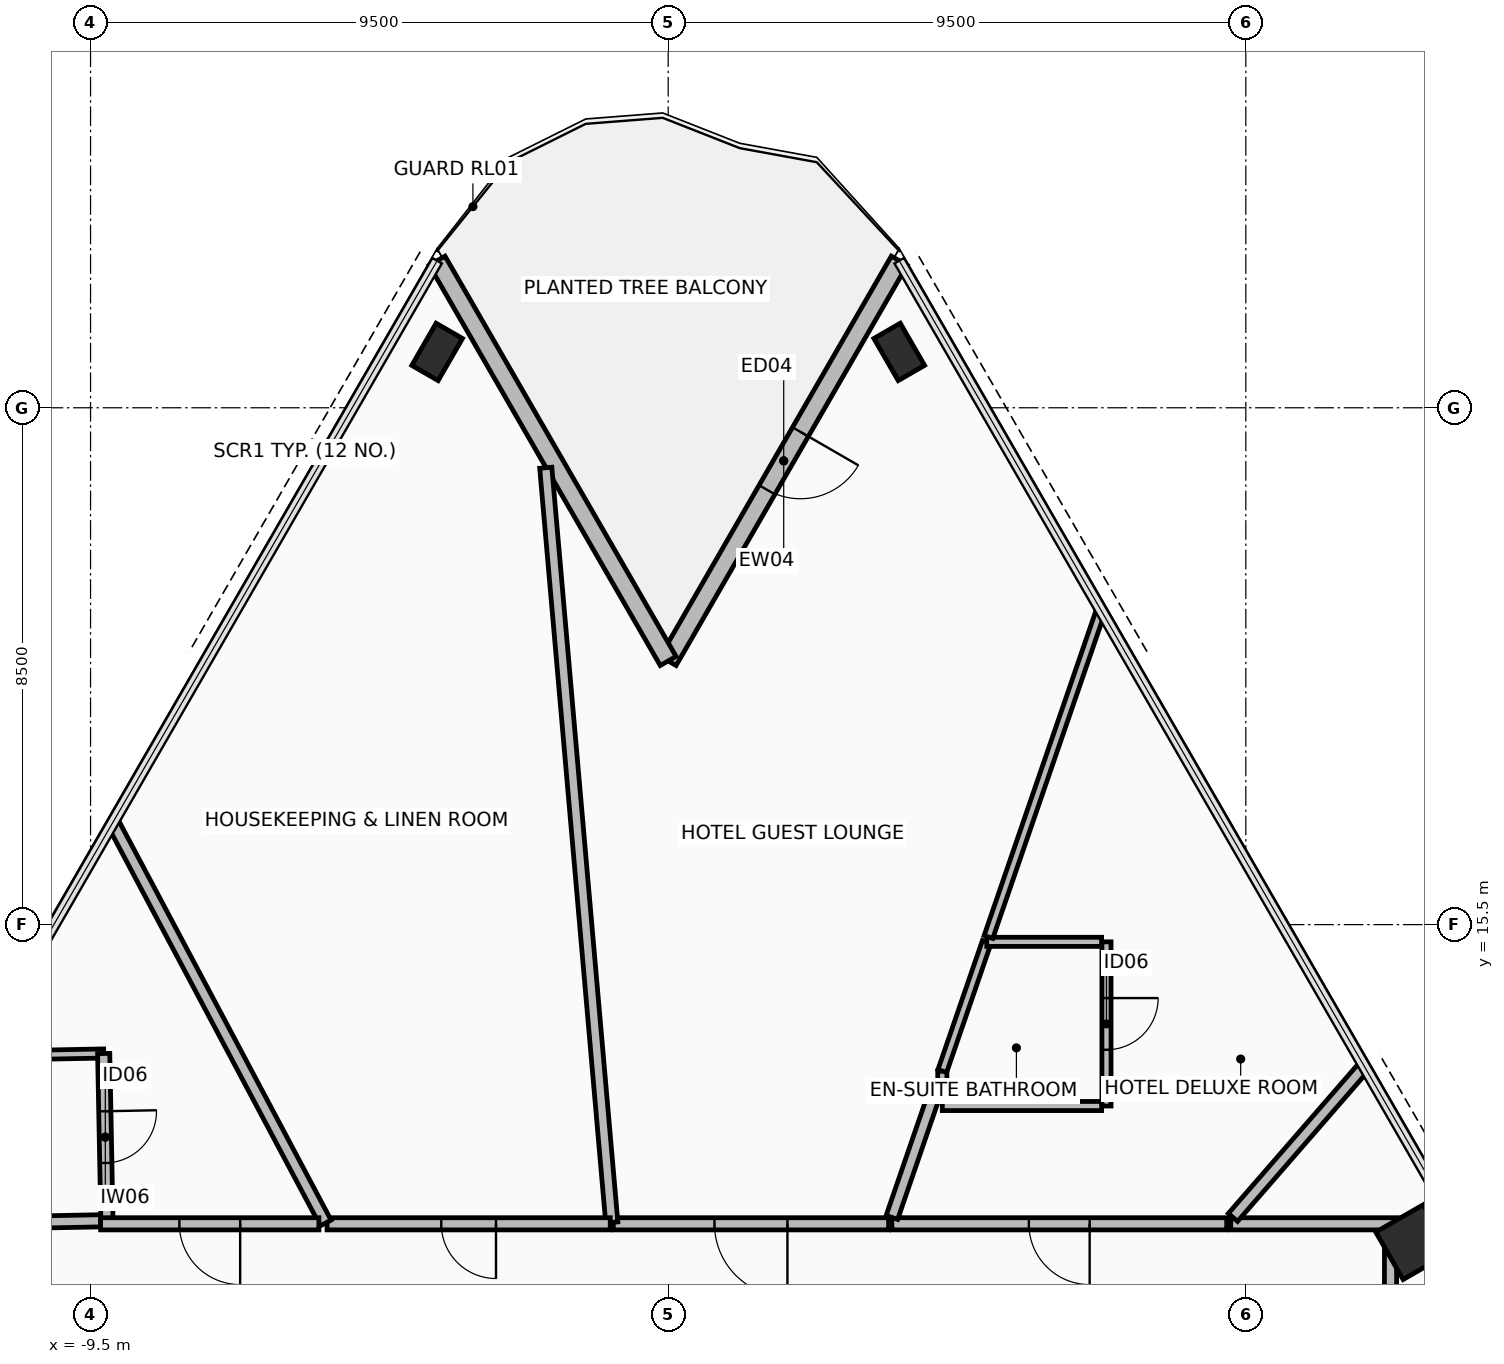
"""IFC4 building model, lengths in metres.
Left out: names, types, materials, properties, quantities, classifications, styles, units other than length and angle.
Written with IfcOpenShell. Run it as: python <this file> out.ifc"""

import sys

from ifc_helpers import new_model, si_unit, direction, frame, frame_2d, origin, origin_2d, place, context, subcontext, project, spatial, rectangle, hollow_rectangle, extrude, element, fill, save


model = new_model("IFC4")
c1 = context("Model", 3, precision=1e-05, world=origin(), true_north=direction((0.0, 1.0)))
c2 = subcontext(c1, "Body", "Model", "MODEL_VIEW")
j1 = project(units=[si_unit("LENGTHUNIT", "METRE"), si_unit("PLANEANGLEUNIT", "RADIAN")], contexts=[c1])
p1 = place(None, origin())
s1 = spatial("IfcSite", under=j1, at=p1, CompositionType="ELEMENT")
p2 = place(p1, origin())
s2 = spatial("IfcBuilding", under=s1, at=p2, CompositionType="ELEMENT")
p3 = place(p2, frame((0.0, 0.0, 38.65)))
s3 = spatial("IfcBuildingStorey", under=s2, at=p3, CompositionType="ELEMENT", Elevation=38.65)
p4 = place(p3, frame((-3.8, 24.918, 0.0), z_axis=(0.0, 0.0, 1.0), x_axis=(0.500001511499, 0.866024531118, 0.0)))
e1 = element("IfcColumn", 1, at=p4, inside=s3, PredefinedType="COLUMN", context=c2, shape_type="SweptSolid", body=[
    extrude(hollow_rectangle(XDim=0.5, YDim=0.8, WallThickness=0.04, at=origin_2d()), origin(), (0.0, 0.0, 1.0), 3.4),
])
p5 = place(p3, frame((12.252, 10.279, 0.0), z_axis=(0.0, 0.0, 1.0), x_axis=(-0.500001511499, 0.866024531118, 0.0)))
e2 = element("IfcColumn", 2, at=p5, inside=s3, PredefinedType="COLUMN", context=c2, shape_type="SweptSolid", body=[
    extrude(hollow_rectangle(XDim=0.9, YDim=0.9, WallThickness=0.05, at=origin_2d()), origin(), (0.0, 0.0, 1.0), 3.4),
])
p6 = place(p3, frame((3.8, 24.918, 0.0), z_axis=(0.0, 0.0, 1.0), x_axis=(-0.500001511499, 0.866024531118, 0.0)))
e3 = element("IfcColumn", 3, at=p6, inside=s3, PredefinedType="COLUMN", context=c2, shape_type="SweptSolid", body=[
    extrude(hollow_rectangle(XDim=0.5, YDim=0.8, WallThickness=0.04, at=origin_2d()), origin(), (0.0, 0.0, 1.0), 3.4),
])
p7 = place(p3, frame((3.8, 26.418, 0.0), z_axis=(0.0, 0.0, 1.0), x_axis=(-0.500005158081, -0.866022425744, 0.0)))
e4 = element("IfcWall", 4, at=p7, inside=s3, PredefinedType="STANDARD", context=c2, shape_type="SweptSolid", body=[
    extrude(rectangle(XDim=7.6, YDim=0.3, at=frame_2d((3.8, 0.0))), origin(), (0.0, 0.0, 1.0), 2.42),
])
p8 = place(p7, frame((3.25, 0.0, 0.0)))
e5 = element("IfcOpeningElement", 5, at=p8, cuts=e4, PredefinedType="OPENING", context=c2, shape_type="SweptSolid", body=[
    extrude(rectangle(XDim=1.1, YDim=2.2, at=frame_2d((0.55, 1.1))), frame((0.0, 0.16, 0.0), z_axis=(0.0, -1.0, 0.0), x_axis=(1.0, 0.0, 0.0)), (0.0, 0.0, 1.0), 0.32),
])
p9 = place(p3, frame((0.0, 19.836, 0.0), z_axis=(0.0, 0.0, 1.0), x_axis=(-0.500005158081, 0.866022425744, 0.0)))
e6 = element("IfcWall", 6, at=p9, inside=s3, PredefinedType="STANDARD", context=c2, shape_type="SweptSolid", body=[
    extrude(rectangle(XDim=7.6, YDim=0.3, at=frame_2d((3.8, 0.0))), origin(), (0.0, 0.0, 1.0), 2.42),
])
p10 = place(p3, frame((7.208, 15.217, 0.0), z_axis=(0.0, 0.0, 1.0), x_axis=(0.0, -1.0, 0.0)))
e7 = element("IfcWall", 7, at=p10, inside=s3, PredefinedType="PARTITIONING", context=c2, shape_type="SweptSolid", body=[
    extrude(rectangle(XDim=2.7, YDim=0.15, at=frame_2d((1.35, 0.0))), origin(), (0.0, 0.0, 1.0), 2.82),
])
p11 = place(p10, frame((0.925, 0.0, 0.0)))
e8 = element("IfcOpeningElement", 8, at=p11, cuts=e7, PredefinedType="OPENING", context=c2, shape_type="SweptSolid", body=[
    extrude(rectangle(XDim=0.85, YDim=2.1, at=frame_2d((0.425, 1.05))), frame((0.0, 0.085, 0.0), z_axis=(0.0, -1.0, 0.0), x_axis=(1.0, 0.0, 0.0)), (0.0, 0.0, 1.0), 0.17),
])
p12 = place(p3, frame((7.128, 12.517, 0.0), z_axis=(0.0, 0.0, 1.0), x_axis=(-1.0, 0.0, 0.0)))
e9 = element("IfcWall", 9, at=p12, inside=s3, PredefinedType="PARTITIONING", context=c2, shape_type="SweptSolid", body=[
    extrude(rectangle(XDim=2.62, YDim=0.15, at=frame_2d((1.31, 0.0))), origin(), (0.0, 0.0, 1.0), 2.82),
])
p13 = place(p3, frame((4.508, 12.597, 0.0), z_axis=(0.0, 0.0, 1.0), x_axis=(0.0, 1.0, 0.0)))
e10 = element("IfcWall", 10, at=p13, inside=s3, PredefinedType="PARTITIONING", context=c2, shape_type="SweptSolid", body=[
    extrude(rectangle(XDim=0.496, YDim=0.15, at=frame_2d((0.248, 0.0))), origin(), (0.0, 0.0, 1.0), 3.225),
])
p14 = place(p3, frame((4.508, 13.093, 0.0), z_axis=(0.0, 0.0, 1.0), x_axis=(0.325635598236, 0.945495350153, 0.0)))
e11 = element("IfcWall", 11, at=p14, inside=s3, PredefinedType="PARTITIONING", context=c2, shape_type="SweptSolid", body=[
    extrude(rectangle(XDim=2.246, YDim=0.15, at=frame_2d((1.123, 0.0))), origin(), (0.0, 0.0, 1.0), 2.82),
])
p15 = place(p3, frame((5.24, 15.217, 0.0), z_axis=(0.0, 0.0, 1.0), x_axis=(1.0, 0.0, 0.0)))
e12 = element("IfcWall", 12, at=p15, inside=s3, PredefinedType="PARTITIONING", context=c2, shape_type="SweptSolid", body=[
    extrude(rectangle(XDim=1.889, YDim=0.15, at=frame_2d((0.944, 0.0))), origin(), (0.0, 0.0, 1.0), 2.82),
])
p16 = place(p3, frame((-11.35, 13.341, 0.0), z_axis=(0.0, 0.0, 1.0), x_axis=(0.99981237896, 0.019370257549, 0.0)))
e13 = element("IfcWall", 13, at=p16, inside=s3, PredefinedType="PARTITIONING", context=c2, shape_type="SweptSolid", body=[
    extrude(rectangle(XDim=2.067, YDim=0.15, at=frame_2d((1.034, 0.0))), origin(), (0.0, 0.0, 1.0), 2.42),
])
p17 = place(p3, frame((-9.284, 13.381, 0.0), z_axis=(0.0, 0.0, 1.0), x_axis=(0.019353504647, -0.999812703389, 0.0)))
e14 = element("IfcWall", 14, at=p17, inside=s3, PredefinedType="PARTITIONING", context=c2, shape_type="SweptSolid", body=[
    extrude(rectangle(XDim=2.75, YDim=0.2, at=frame_2d((1.375, 0.0))), origin(), (0.0, 0.0, 1.0), 3.225),
])
p18 = place(p17, frame((0.95, 0.0, 0.0)))
e15 = element("IfcOpeningElement", 15, at=p18, cuts=e14, PredefinedType="OPENING", context=c2, shape_type="SweptSolid", body=[
    extrude(rectangle(XDim=0.85, YDim=2.1, at=frame_2d((0.425, 1.05))), frame((0.0, 0.11, 0.0), z_axis=(0.0, -1.0, 0.0), x_axis=(1.0, 0.0, 0.0)), (0.0, 0.0, 1.0), 0.22),
])
p19 = place(p3, frame((-9.335, 10.629, 0.0), z_axis=(0.0, 0.0, 1.0), x_axis=(-0.999811508702, -0.019415124705, 0.0)))
e16 = element("IfcWall", 16, at=p19, inside=s3, PredefinedType="PARTITIONING", context=c2, shape_type="SweptSolid", body=[
    extrude(rectangle(XDim=3.622, YDim=0.2, at=frame_2d((1.811, 0.0))), origin(), (0.0, 0.0, 1.0), 2.42),
])
p20 = place(p3, frame((12.944, 10.58, 0.0), z_axis=(0.0, 0.0, 1.0), x_axis=(-1.0, 0.0, 0.0)))
e17 = element("IfcWall", 17, at=p20, inside=s3, PredefinedType="PARTITIONING", context=c2, shape_type="SweptSolid", body=[
    extrude(rectangle(XDim=3.692, YDim=0.2, at=frame_2d((1.846, 0.0))), origin(), (0.0, 0.0, 1.0), 2.42),
])
p21 = place(p3, frame((9.288, 10.685, 0.0), z_axis=(0.0, 0.0, 1.0), x_axis=(0.656044714013, 0.754722023805, 0.0)))
e18 = element("IfcWall", 18, at=p21, inside=s3, PredefinedType="PARTITIONING", context=c2, shape_type="SweptSolid", body=[
    extrude(rectangle(XDim=3.293, YDim=0.2, at=frame_2d((1.646, 0.0))), origin(), (0.0, 0.0, 1.0), 2.42),
])
p22 = place(p3, frame((11.88, 6.171, 0.0), z_axis=(0.0, 0.0, 1.0), x_axis=(0.0, 1.0, 0.0)))
e19 = element("IfcWall", 19, at=p22, inside=s3, PredefinedType="PARTITIONING", context=c2, shape_type="SweptSolid", body=[
    extrude(rectangle(XDim=4.304, YDim=0.2, at=frame_2d((2.152, 0.0))), origin(), (0.0, 0.0, 1.0), 2.42),
])
p23 = place(p22, frame((1.552, 0.0, 0.0)))
e20 = element("IfcOpeningElement", 20, at=p23, cuts=e19, PredefinedType="OPENING", context=c2, shape_type="SweptSolid", body=[
    extrude(rectangle(XDim=1.2, YDim=2.15, at=frame_2d((0.6, 1.075))), frame((0.0, 0.11, 0.0), z_axis=(0.0, -1.0, 0.0), x_axis=(1.0, 0.0, 0.0)), (0.0, 0.0, 1.0), 0.22),
])
p24 = place(p3, frame((9.186, 10.58, 0.0), z_axis=(0.0, 0.0, 1.0), x_axis=(-1.0, 0.0, 0.0)))
e21 = element("IfcWall", 21, at=p24, inside=s3, PredefinedType="PARTITIONING", context=c2, shape_type="SweptSolid", body=[
    extrude(rectangle(XDim=5.508, YDim=0.2, at=frame_2d((2.754, 0.0))), origin(), (0.0, 0.0, 1.0), 2.82),
])
p25 = place(p24, frame((2.254, 0.0, 0.0)))
e22 = element("IfcOpeningElement", 22, at=p25, cuts=e21, PredefinedType="OPENING", context=c2, shape_type="SweptSolid", body=[
    extrude(rectangle(XDim=1.0, YDim=2.15, at=frame_2d((0.5, 1.075))), frame((0.0, 0.11, 0.0), z_axis=(0.0, -1.0, 0.0), x_axis=(1.0, 0.0, 0.0)), (0.0, 0.0, 1.0), 0.22),
])
p26 = place(p3, frame((3.679, 10.685, 0.0), z_axis=(0.0, 0.0, 1.0), x_axis=(0.325506719361, 0.945539727167, 0.0)))
e23 = element("IfcWall", 23, at=p26, inside=s3, PredefinedType="PARTITIONING", context=c2, shape_type="SweptSolid", body=[
    extrude(rectangle(XDim=2.301, YDim=0.2, at=frame_2d((1.15, 0.0))), origin(), (0.0, 0.0, 1.0), 3.225),
])
p27 = place(p3, frame((5.267, 15.297, 0.0), z_axis=(0.0, 0.0, 1.0), x_axis=(0.325605473746, 0.945505724714, 0.0)))
e24 = element("IfcWall", 24, at=p27, inside=s3, PredefinedType="PARTITIONING", context=c2, shape_type="SweptSolid", body=[
    extrude(rectangle(XDim=5.684, YDim=0.15, at=frame_2d((2.842, 0.0))), origin(), (0.0, 0.0, 1.0), 2.42),
])
p28 = place(p3, frame((3.625, 10.58, 0.0), z_axis=(0.0, 0.0, 1.0), x_axis=(-1.0, 0.0, 0.0)))
e25 = element("IfcWall", 25, at=p28, inside=s3, PredefinedType="PARTITIONING", context=c2, shape_type="SweptSolid", body=[
    extrude(rectangle(XDim=4.528, YDim=0.2, at=frame_2d((2.264, 0.0))), origin(), (0.0, 0.0, 1.0), 2.57),
])
p29 = place(p28, frame((1.664, 0.0, 0.0)))
e26 = element("IfcOpeningElement", 26, at=p29, cuts=e25, PredefinedType="OPENING", context=c2, shape_type="SweptSolid", body=[
    extrude(rectangle(XDim=1.2, YDim=2.15, at=frame_2d((0.6, 1.075))), frame((0.0, 0.11, 0.0), z_axis=(0.0, -1.0, 0.0), x_axis=(1.0, 0.0, 0.0)), (0.0, 0.0, 1.0), 0.22),
])
p30 = place(p3, frame((-0.927, 10.603, 0.0), z_axis=(0.0, 0.0, 1.0), x_axis=(-0.08716403318, 0.996193972738, 0.0)))
e27 = element("IfcWall", 27, at=p30, inside=s3, PredefinedType="PARTITIONING", context=c2, shape_type="SweptSolid", body=[
    extrude(rectangle(XDim=12.458, YDim=0.2, at=frame_2d((6.229, 0.0))), origin(), (0.0, 0.0, 1.0), 3.225),
])
p31 = place(p3, frame((-0.953, 10.58, 0.0), z_axis=(0.0, 0.0, 1.0), x_axis=(-1.0, 0.0, 0.0)))
e28 = element("IfcWall", 28, at=p31, inside=s3, PredefinedType="PARTITIONING", context=c2, shape_type="SweptSolid", body=[
    extrude(rectangle(XDim=4.658, YDim=0.2, at=frame_2d((2.329, 0.0))), origin(), (0.0, 0.0, 1.0), 3.225),
])
p32 = place(p31, frame((1.879, 0.0, 0.0)))
e29 = element("IfcOpeningElement", 29, at=p32, cuts=e28, PredefinedType="OPENING", context=c2, shape_type="SweptSolid", body=[
    extrude(rectangle(XDim=0.9, YDim=2.1, at=frame_2d((0.45, 1.05))), frame((0.0, 0.11, 0.0), z_axis=(0.0, -1.0, 0.0), x_axis=(1.0, 0.0, 0.0)), (0.0, 0.0, 1.0), 0.22),
])
p33 = place(p3, frame((-5.633, 10.593, 0.0), z_axis=(0.0, 0.0, 1.0), x_axis=(-0.469464495308, 0.882951350668, 0.0)))
e30 = element("IfcWall", 30, at=p33, inside=s3, PredefinedType="PARTITIONING", context=c2, shape_type="SweptSolid", body=[
    extrude(rectangle(XDim=7.445, YDim=0.2, at=frame_2d((3.722, 0.0))), origin(), (0.0, 0.0, 1.0), 2.42),
])
p34 = place(p3, frame((-5.744, 10.58, 0.0), z_axis=(0.0, 0.0, 1.0), x_axis=(-1.0, 0.0, 0.0)))
e31 = element("IfcWall", 31, at=p34, inside=s3, PredefinedType="PARTITIONING", context=c2, shape_type="SweptSolid", body=[
    extrude(rectangle(XDim=3.59, YDim=0.2, at=frame_2d((1.795, 0.0))), origin(), (0.0, 0.0, 1.0), 2.62),
])
p35 = place(p34, frame((1.295, 0.0, 0.0)))
e32 = element("IfcOpeningElement", 32, at=p35, cuts=e31, PredefinedType="OPENING", context=c2, shape_type="SweptSolid", body=[
    extrude(rectangle(XDim=1.0, YDim=2.15, at=frame_2d((0.5, 1.075))), frame((0.0, 0.11, 0.0), z_axis=(0.0, -1.0, 0.0), x_axis=(1.0, 0.0, 0.0)), (0.0, 0.0, 1.0), 0.22),
])
p36 = place(p8, origin())
e33 = element("IfcDoor", 33, at=p36, inside=s3, OperationType="SINGLE_SWING_LEFT", PredefinedType="DOOR", context=c2, shape_type="SweptSolid", body=[
    extrude(rectangle(XDim=1.1, YDim=2.2, at=frame_2d((0.55, 1.1))), frame((0.0, 0.025, 0.0), z_axis=(0.0, -1.0, 0.0), x_axis=(1.0, 0.0, 0.0)), (0.0, 0.0, 1.0), 0.05),
])
fill(e5, e33)
p37 = place(p11, origin())
e34 = element("IfcDoor", 34, at=p37, inside=s3, OperationType="SINGLE_SWING_RIGHT", PredefinedType="DOOR", context=c2, shape_type="SweptSolid", body=[
    extrude(rectangle(XDim=0.85, YDim=2.1, at=frame_2d((0.425, 1.05))), frame((0.0, 0.025, 0.0), z_axis=(0.0, -1.0, 0.0), x_axis=(1.0, 0.0, 0.0)), (0.0, 0.0, 1.0), 0.05),
])
fill(e8, e34)
p38 = place(p18, origin())
e35 = element("IfcDoor", 35, at=p38, inside=s3, OperationType="SINGLE_SWING_RIGHT", PredefinedType="DOOR", context=c2, shape_type="SweptSolid", body=[
    extrude(rectangle(XDim=0.85, YDim=2.1, at=frame_2d((0.425, 1.05))), frame((0.0, 0.025, 0.0), z_axis=(0.0, -1.0, 0.0), x_axis=(1.0, 0.0, 0.0)), (0.0, 0.0, 1.0), 0.05),
])
fill(e15, e35)
p39 = place(p25, origin())
e36 = element("IfcDoor", 36, at=p39, inside=s3, OperationType="SINGLE_SWING_LEFT", PredefinedType="DOOR", context=c2, shape_type="SweptSolid", body=[
    extrude(rectangle(XDim=1.0, YDim=2.15, at=frame_2d((0.5, 1.075))), frame((0.0, 0.025, 0.0), z_axis=(0.0, -1.0, 0.0), x_axis=(1.0, 0.0, 0.0)), (0.0, 0.0, 1.0), 0.05),
])
fill(e22, e36)
p40 = place(p29, origin())
e37 = element("IfcDoor", 37, at=p40, inside=s3, OperationType="SINGLE_SWING_LEFT", PredefinedType="DOOR", context=c2, shape_type="SweptSolid", body=[
    extrude(rectangle(XDim=1.2, YDim=2.15, at=frame_2d((0.6, 1.075))), frame((0.0, 0.025, 0.0), z_axis=(0.0, -1.0, 0.0), x_axis=(1.0, 0.0, 0.0)), (0.0, 0.0, 1.0), 0.05),
])
fill(e26, e37)
p41 = place(p32, origin())
e38 = element("IfcDoor", 38, at=p41, inside=s3, OperationType="SINGLE_SWING_LEFT", PredefinedType="DOOR", context=c2, shape_type="SweptSolid", body=[
    extrude(rectangle(XDim=0.9, YDim=2.1, at=frame_2d((0.45, 1.05))), frame((0.0, 0.025, 0.0), z_axis=(0.0, -1.0, 0.0), x_axis=(1.0, 0.0, 0.0)), (0.0, 0.0, 1.0), 0.05),
])
fill(e29, e38)
p42 = place(p35, origin())
e39 = element("IfcDoor", 39, at=p42, inside=s3, OperationType="SINGLE_SWING_LEFT", PredefinedType="DOOR", context=c2, shape_type="SweptSolid", body=[
    extrude(rectangle(XDim=1.0, YDim=2.15, at=frame_2d((0.5, 1.075))), frame((0.0, 0.025, 0.0), z_axis=(0.0, -1.0, 0.0), x_axis=(1.0, 0.0, 0.0)), (0.0, 0.0, 1.0), 0.05),
])
fill(e32, e39)
save(model, sys.argv[1])
